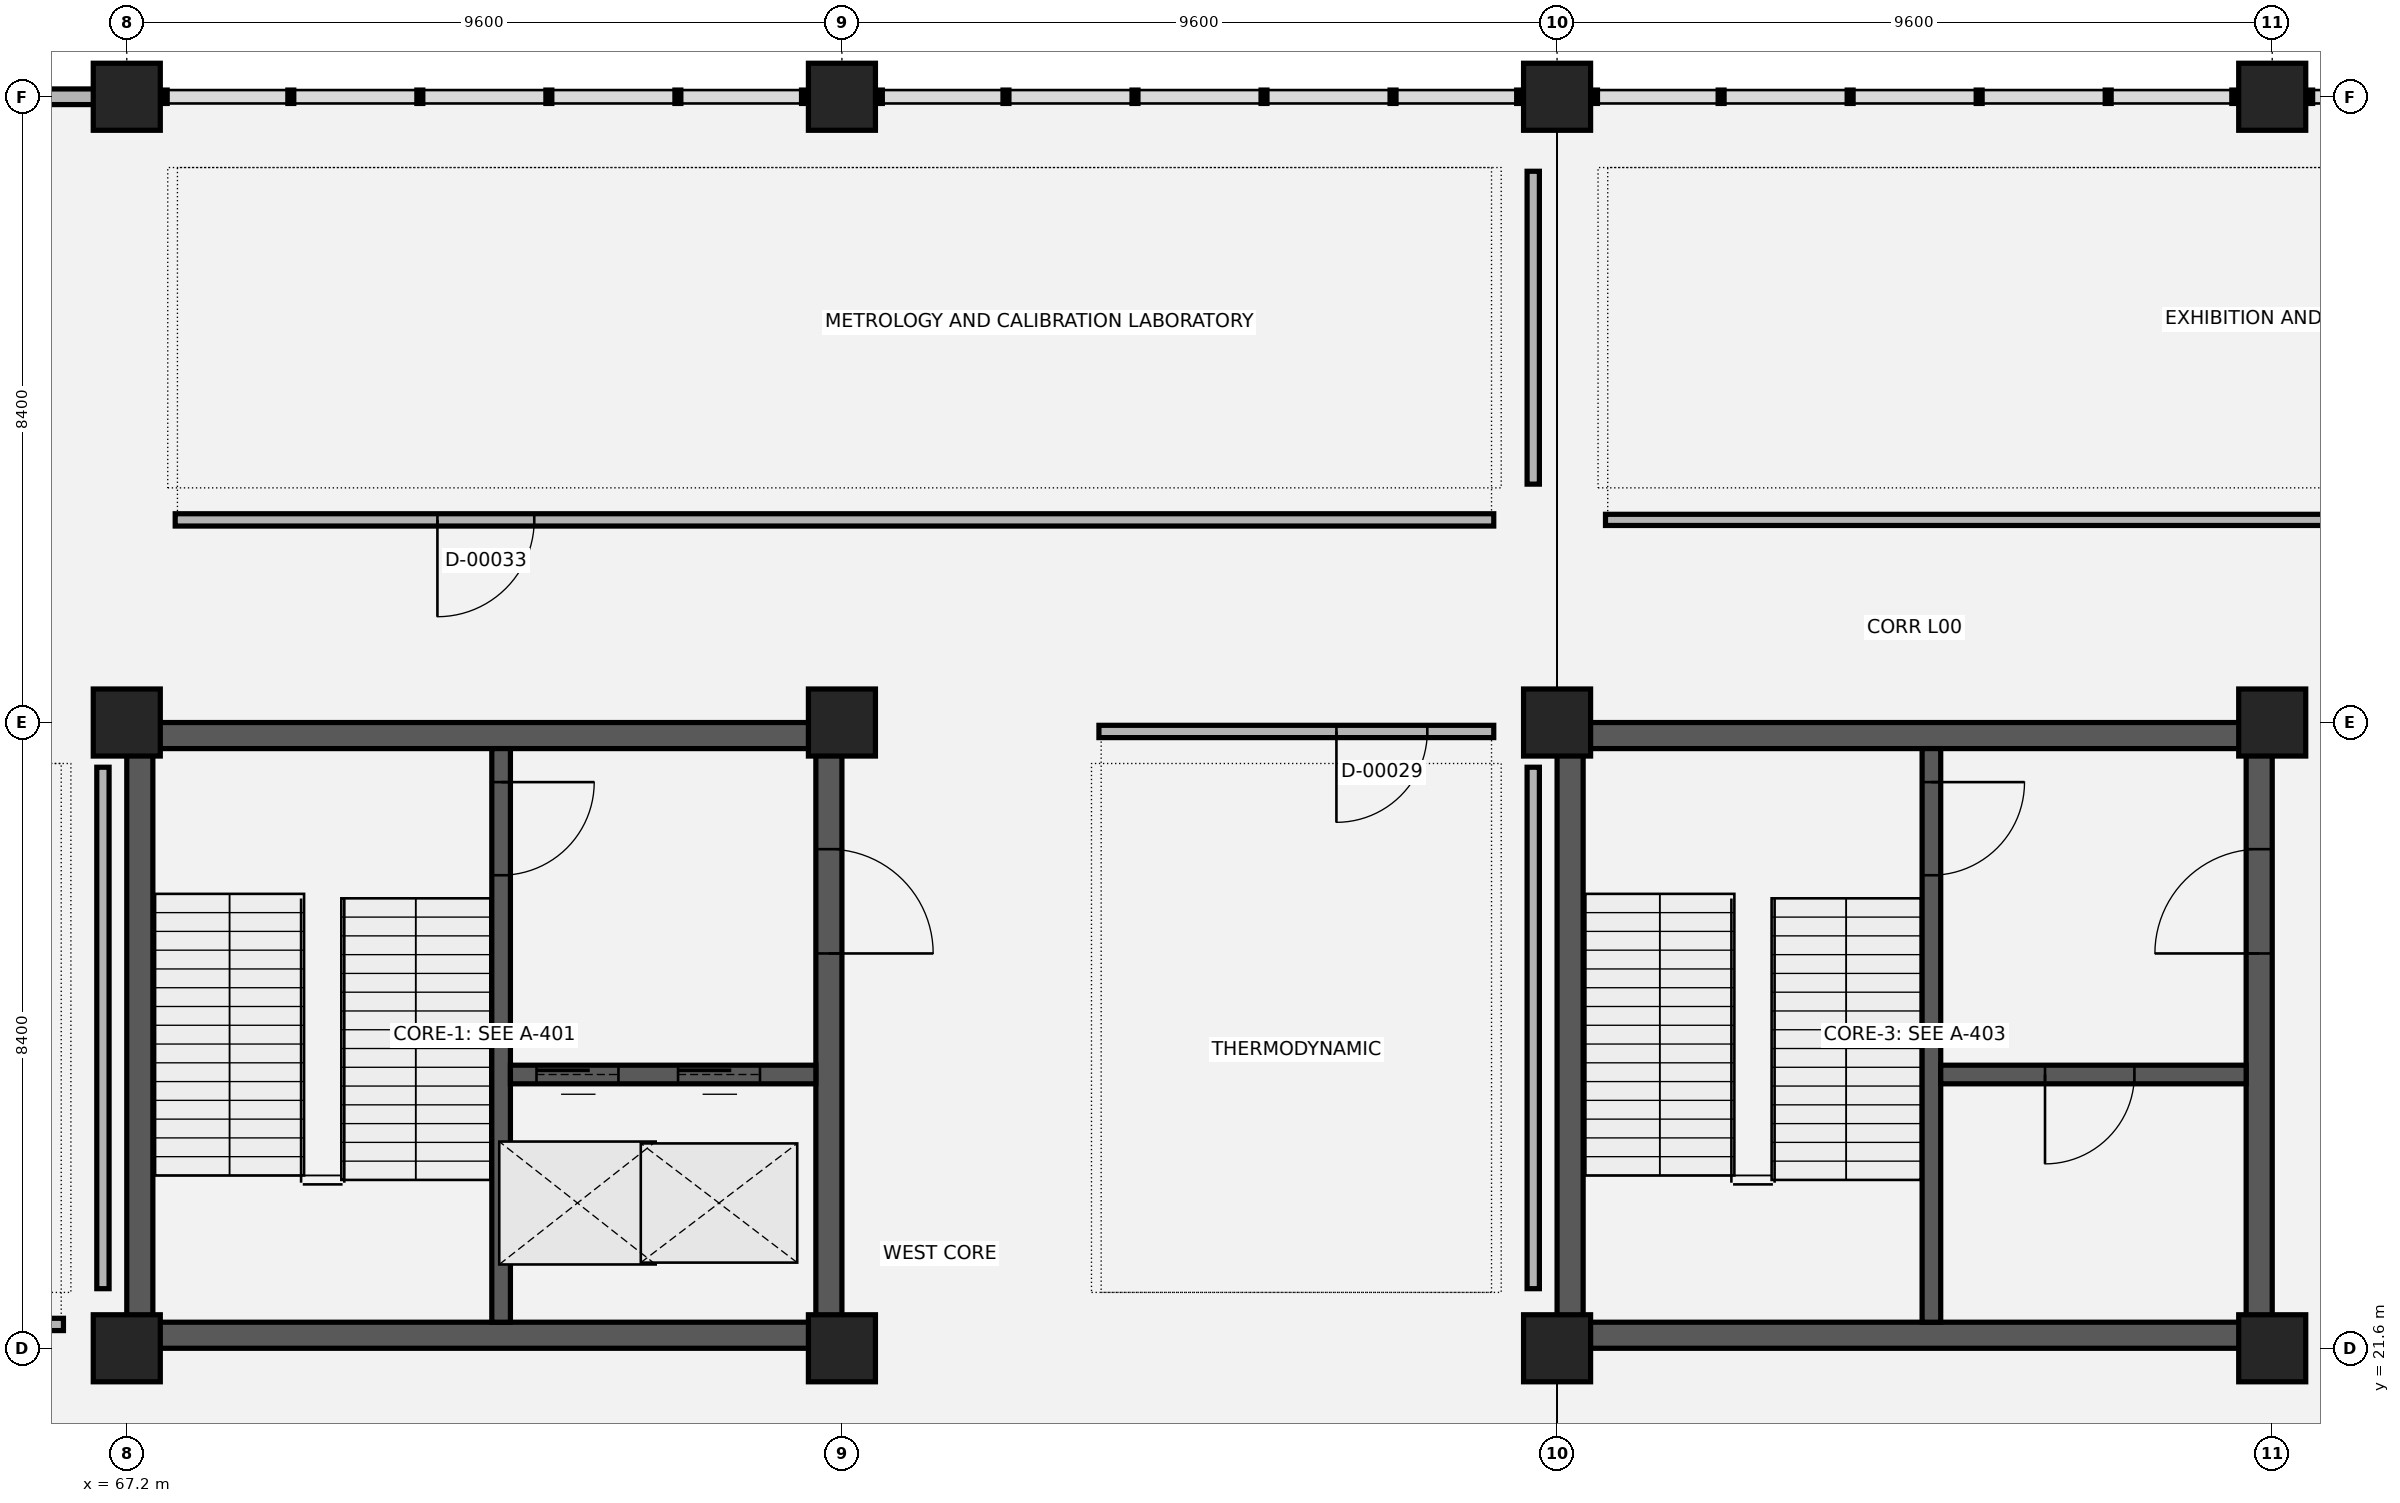
"""IFC4 building model, lengths in metres.
Left out: names, types, materials, properties, quantities, classifications, styles, units other than length and angle.
Written with IfcOpenShell. Run it as: python <this file> out.ifc"""

import sys

from ifc_helpers import new_model, si_unit, direction, frame, frame_2d, origin, origin_2d, place, context, subcontext, project, spatial, rectangle, extrude, element, fill, save


model = new_model("IFC4")
c1 = context("Model", 3, precision=1e-05, world=origin(), true_north=direction((0.0, 1.0)))
c2 = subcontext(c1, "Body", "Model", "MODEL_VIEW")
j1 = project(units=[si_unit("LENGTHUNIT", "METRE"), si_unit("PLANEANGLEUNIT", "RADIAN")], contexts=[c1])
p1 = place(None, origin())
s1 = spatial("IfcSite", under=j1, at=p1, CompositionType="ELEMENT")
p2 = place(p1, origin())
s2 = spatial("IfcBuilding", under=s1, at=p2, CompositionType="ELEMENT")
p3 = place(p2, origin())
s3 = spatial("IfcBuildingStorey", under=s2, at=p3, CompositionType="ELEMENT", Elevation=0.0)
for number, where, z_axis, x_axis in (
    (1, (67.2, 21.6, 0.0), (0.0, 0.0, 1.0), (1.0, 0.0, 0.0)),
    (2, (67.2, 30.0, 0.0), (0.0, 0.0, 1.0), (1.0, 0.0, 0.0)),
    (3, (67.2, 38.4, 0.0), (0.0, 0.0, 1.0), (1.0, 0.0, 0.0)),
    (4, (76.8, 21.6, 0.0), (0.0, 0.0, 1.0), (1.0, 0.0, 0.0)),
    (5, (76.8, 30.0, 0.0), (0.0, 0.0, 1.0), (1.0, 0.0, 0.0)),
    (6, (76.8, 38.4, 0.0), (0.0, 0.0, 1.0), (1.0, 0.0, 0.0)),
    (7, (86.4, 21.6, 0.0), (0.0, 0.0, 1.0), (1.0, 0.0, 0.0)),
    (8, (86.4, 30.0, 0.0), (0.0, 0.0, 1.0), (1.0, 0.0, 0.0)),
    (9, (86.4, 38.4, 0.0), (0.0, 0.0, 1.0), (1.0, 0.0, 0.0)),
    (10, (96.0, 21.6, 0.0), (0.0, 0.0, 1.0), (1.0, 0.0, 0.0)),
    (11, (96.0, 30.0, 0.0), (0.0, 0.0, 1.0), (1.0, 0.0, 0.0)),
    (12, (96.0, 38.4, 0.0), (0.0, 0.0, 1.0), (1.0, 0.0, 0.0)),
):
    element("IfcColumn", number, at=place(p3, frame(where, z_axis=z_axis, x_axis=x_axis)), inside=s3, PredefinedType="COLUMN", context=c2, shape_type="SweptSolid", body=[
        extrude(rectangle(XDim=0.9, YDim=0.9, at=origin_2d()), origin(), (0.0, 0.0, 1.0), 5.4),
    ])
p4 = place(p3, frame((66.82, 38.4, 0.0), z_axis=(0.0, 0.0, 1.0), x_axis=(-1.0, 0.0, 0.0)))
e13 = element("IfcWall", 13, at=p4, inside=s3, PredefinedType="SOLIDWALL", context=c2, shape_type="SweptSolid", body=[
    extrude(rectangle(XDim=4.04, YDim=0.21, at=frame_2d((2.02, 0.0))), origin(), (0.0, 0.0, 1.0), 4.04),
])
p5 = place(p4, frame((1.27, 0.0, 0.9)))
e14 = element("IfcOpeningElement", 14, at=p5, cuts=e13, PredefinedType="OPENING", context=c2, shape_type="SweptSolid", body=[
    extrude(rectangle(XDim=1.5, YDim=1.5, at=frame_2d((0.75, 0.75))), frame((0.0, 0.115, 0.0), z_axis=(0.0, -1.0, 0.0), x_axis=(1.0, 0.0, 0.0)), (0.0, 0.0, 1.0), 0.23),
])
for number, where, z_axis, x_axis in (
    (15, (67.2, 29.825, 0.0), (0.0, 0.0, 1.0), (1.0, 0.0, 0.0)),
    (16, (67.2, 21.775, 0.0), (0.0, 0.0, 1.0), (1.0, 0.0, 0.0)),
):
    element("IfcWall", number, at=place(p3, frame(where, z_axis=z_axis, x_axis=x_axis)), inside=s3, PredefinedType="SHEAR", context=c2, shape_type="SweptSolid", body=[
        extrude(rectangle(XDim=9.6, YDim=0.35, at=frame_2d((4.8, 0.0))), origin(), (0.0, 0.0, 1.0), 5.11),
    ])
p6 = place(p3, frame((67.375, 21.6, 0.0), z_axis=(0.0, 0.0, 1.0), x_axis=(0.0, 1.0, 0.0)))
e17 = element("IfcWall", 17, at=p6, inside=s3, PredefinedType="SHEAR", context=c2, shape_type="SweptSolid", body=[
    extrude(rectangle(XDim=8.4, YDim=0.35, at=frame_2d((4.2, 0.0))), origin(), (0.0, 0.0, 1.0), 5.11),
])
p7 = place(p3, frame((76.625, 21.6, 0.0), z_axis=(0.0, 0.0, 1.0), x_axis=(0.0, 1.0, 0.0)))
e18 = element("IfcWall", 18, at=p7, inside=s3, PredefinedType="SHEAR", context=c2, shape_type="SweptSolid", body=[
    extrude(rectangle(XDim=8.4, YDim=0.35, at=frame_2d((4.2, 0.0))), origin(), (0.0, 0.0, 1.0), 5.11),
])
p8 = place(p7, frame((5.3, 0.0, 0.0)))
e19 = element("IfcOpeningElement", 19, at=p8, cuts=e18, PredefinedType="OPENING", context=c2, shape_type="SweptSolid", body=[
    extrude(rectangle(XDim=1.4, YDim=2.15, at=frame_2d((0.7, 1.075))), frame((0.0, 0.185, 0.0), z_axis=(0.0, -1.0, 0.0), x_axis=(1.0, 0.0, 0.0)), (0.0, 0.0, 1.0), 0.37),
])
p9 = place(p3, frame((72.225, 29.65, 0.0), z_axis=(0.0, 0.0, 1.0), x_axis=(0.0, -1.0, 0.0)))
e20 = element("IfcWall", 20, at=p9, inside=s3, PredefinedType="SHEAR", context=c2, shape_type="SweptSolid", body=[
    extrude(rectangle(XDim=7.7, YDim=0.25, at=frame_2d((3.85, 0.0))), origin(), (0.0, 0.0, 1.0), 5.11),
])
p10 = place(p9, frame((0.45, 0.0, 0.0)))
e21 = element("IfcOpeningElement", 21, at=p10, cuts=e20, PredefinedType="OPENING", context=c2, shape_type="SweptSolid", body=[
    extrude(rectangle(XDim=1.25, YDim=2.15, at=frame_2d((0.625, 1.075))), frame((0.0, 0.135, 0.0), z_axis=(0.0, -1.0, 0.0), x_axis=(1.0, 0.0, 0.0)), (0.0, 0.0, 1.0), 0.27),
])
p11 = place(p3, frame((72.35, 25.275, 0.0), z_axis=(0.0, 0.0, 1.0), x_axis=(1.0, 0.0, 0.0)))
e22 = element("IfcWall", 22, at=p11, inside=s3, PredefinedType="SHEAR", context=c2, shape_type="SweptSolid", body=[
    extrude(rectangle(XDim=4.1, YDim=0.25, at=frame_2d((2.05, 0.0))), origin(), (0.0, 0.0, 1.0), 5.11),
])
p12 = place(p11, frame((0.35, 0.0, 0.0)))
e23 = element("IfcOpeningElement", 23, at=p12, cuts=e22, PredefinedType="OPENING", context=c2, shape_type="SweptSolid", body=[
    extrude(rectangle(XDim=1.1, YDim=2.15, at=frame_2d((0.55, 1.075))), frame((0.0, 0.135, 0.0), z_axis=(0.0, -1.0, 0.0), x_axis=(1.0, 0.0, 0.0)), (0.0, 0.0, 1.0), 0.27),
])
p13 = place(p11, frame((2.25, 0.0, 0.0)))
e24 = element("IfcOpeningElement", 24, at=p13, cuts=e22, PredefinedType="OPENING", context=c2, shape_type="SweptSolid", body=[
    extrude(rectangle(XDim=1.1, YDim=2.15, at=frame_2d((0.55, 1.075))), frame((0.0, 0.135, 0.0), z_axis=(0.0, -1.0, 0.0), x_axis=(1.0, 0.0, 0.0)), (0.0, 0.0, 1.0), 0.27),
])
for number, where, z_axis, x_axis in (
    (25, (86.4, 29.825, 0.0), (0.0, 0.0, 1.0), (1.0, 0.0, 0.0)),
    (26, (86.4, 21.775, 0.0), (0.0, 0.0, 1.0), (1.0, 0.0, 0.0)),
):
    element("IfcWall", number, at=place(p3, frame(where, z_axis=z_axis, x_axis=x_axis)), inside=s3, PredefinedType="SHEAR", context=c2, shape_type="SweptSolid", body=[
        extrude(rectangle(XDim=9.6, YDim=0.35, at=frame_2d((4.8, 0.0))), origin(), (0.0, 0.0, 1.0), 5.11),
    ])
p14 = place(p3, frame((86.575, 21.6, 0.0), z_axis=(0.0, 0.0, 1.0), x_axis=(0.0, 1.0, 0.0)))
e27 = element("IfcWall", 27, at=p14, inside=s3, PredefinedType="SHEAR", context=c2, shape_type="SweptSolid", body=[
    extrude(rectangle(XDim=8.4, YDim=0.35, at=frame_2d((4.2, 0.0))), origin(), (0.0, 0.0, 1.0), 5.11),
])
p15 = place(p3, frame((95.825, 21.6, 0.0), z_axis=(0.0, 0.0, 1.0), x_axis=(0.0, 1.0, 0.0)))
e28 = element("IfcWall", 28, at=p15, inside=s3, PredefinedType="SHEAR", context=c2, shape_type="SweptSolid", body=[
    extrude(rectangle(XDim=8.4, YDim=0.35, at=frame_2d((4.2, 0.0))), origin(), (0.0, 0.0, 1.0), 5.11),
])
p16 = place(p15, frame((5.3, 0.0, 0.0)))
e29 = element("IfcOpeningElement", 29, at=p16, cuts=e28, PredefinedType="OPENING", context=c2, shape_type="SweptSolid", body=[
    extrude(rectangle(XDim=1.4, YDim=2.15, at=frame_2d((0.7, 1.075))), frame((0.0, 0.185, 0.0), z_axis=(0.0, -1.0, 0.0), x_axis=(1.0, 0.0, 0.0)), (0.0, 0.0, 1.0), 0.37),
])
p17 = place(p3, frame((91.425, 29.65, 0.0), z_axis=(0.0, 0.0, 1.0), x_axis=(0.0, -1.0, 0.0)))
e30 = element("IfcWall", 30, at=p17, inside=s3, PredefinedType="SHEAR", context=c2, shape_type="SweptSolid", body=[
    extrude(rectangle(XDim=7.7, YDim=0.25, at=frame_2d((3.85, 0.0))), origin(), (0.0, 0.0, 1.0), 5.11),
])
p18 = place(p17, frame((0.45, 0.0, 0.0)))
e31 = element("IfcOpeningElement", 31, at=p18, cuts=e30, PredefinedType="OPENING", context=c2, shape_type="SweptSolid", body=[
    extrude(rectangle(XDim=1.25, YDim=2.15, at=frame_2d((0.625, 1.075))), frame((0.0, 0.135, 0.0), z_axis=(0.0, -1.0, 0.0), x_axis=(1.0, 0.0, 0.0)), (0.0, 0.0, 1.0), 0.27),
])
p19 = place(p3, frame((91.55, 25.275, 0.0), z_axis=(0.0, 0.0, 1.0), x_axis=(1.0, 0.0, 0.0)))
e32 = element("IfcWall", 32, at=p19, inside=s3, PredefinedType="SHEAR", context=c2, shape_type="SweptSolid", body=[
    extrude(rectangle(XDim=4.1, YDim=0.25, at=frame_2d((2.05, 0.0))), origin(), (0.0, 0.0, 1.0), 5.11),
])
p20 = place(p19, frame((1.4, 0.0, 0.0)))
e33 = element("IfcOpeningElement", 33, at=p20, cuts=e32, PredefinedType="OPENING", context=c2, shape_type="SweptSolid", body=[
    extrude(rectangle(XDim=1.2, YDim=2.15, at=frame_2d((0.6, 1.075))), frame((0.0, 0.135, 0.0), z_axis=(0.0, -1.0, 0.0), x_axis=(1.0, 0.0, 0.0)), (0.0, 0.0, 1.0), 0.27),
])
p21 = place(p3, frame((49.05, 21.92, 0.0), z_axis=(0.0, 0.0, 1.0), x_axis=(1.0, 0.0, 0.0)))
e34 = element("IfcWall", 34, at=p21, inside=s3, PredefinedType="PARTITIONING", context=c2, shape_type="SweptSolid", body=[
    extrude(rectangle(XDim=17.3, YDim=0.165, at=frame_2d((8.65, 0.0))), origin(), (0.0, 0.0, 1.0), 4.04),
])
p22 = place(p21, frame((3.456, 0.0, 0.0)))
e35 = element("IfcOpeningElement", 35, at=p22, cuts=e34, PredefinedType="OPENING", context=c2, shape_type="SweptSolid", body=[
    extrude(rectangle(XDim=1.22, YDim=2.15, at=frame_2d((0.61, 1.075))), frame((0.0, 0.093, 0.0), z_axis=(0.0, -1.0, 0.0), x_axis=(1.0, 0.0, 0.0)), (0.0, 0.0, 1.0), 0.185),
])
p23 = place(p3, frame((66.88, 22.4, 0.0), z_axis=(0.0, 0.0, 1.0), x_axis=(0.0, 1.0, 0.0)))
e36 = element("IfcWall", 36, at=p23, inside=s3, PredefinedType="PARTITIONING", context=c2, shape_type="SweptSolid", body=[
    extrude(rectangle(XDim=7.0, YDim=0.165, at=frame_2d((3.5, 0.0))), origin(), (0.0, 0.0, 1.0), 4.04),
])
p24 = place(p3, frame((80.25, 29.88, 0.0), z_axis=(0.0, 0.0, 1.0), x_axis=(1.0, 0.0, 0.0)))
e37 = element("IfcWall", 37, at=p24, inside=s3, PredefinedType="PARTITIONING", context=c2, shape_type="SweptSolid", body=[
    extrude(rectangle(XDim=5.3, YDim=0.165, at=frame_2d((2.65, 0.0))), origin(), (0.0, 0.0, 1.0), 4.04),
])
p25 = place(p24, frame((3.188, 0.0, 0.0)))
e38 = element("IfcOpeningElement", 38, at=p25, cuts=e37, PredefinedType="OPENING", context=c2, shape_type="SweptSolid", body=[
    extrude(rectangle(XDim=1.22, YDim=2.15, at=frame_2d((0.61, 1.075))), frame((0.0, 0.093, 0.0), z_axis=(0.0, -1.0, 0.0), x_axis=(1.0, 0.0, 0.0)), (0.0, 0.0, 1.0), 0.185),
])
p26 = place(p3, frame((86.08, 22.4, 0.0), z_axis=(0.0, 0.0, 1.0), x_axis=(0.0, 1.0, 0.0)))
e39 = element("IfcWall", 39, at=p26, inside=s3, PredefinedType="PARTITIONING", context=c2, shape_type="SweptSolid", body=[
    extrude(rectangle(XDim=7.0, YDim=0.165, at=frame_2d((3.5, 0.0))), origin(), (0.0, 0.0, 1.0), 4.04),
])
p27 = place(p3, frame((67.85, 32.72, 0.0), z_axis=(0.0, 0.0, 1.0), x_axis=(1.0, 0.0, 0.0)))
e40 = element("IfcWall", 40, at=p27, inside=s3, PredefinedType="PARTITIONING", context=c2, shape_type="SweptSolid", body=[
    extrude(rectangle(XDim=17.7, YDim=0.165, at=frame_2d((8.85, 0.0))), origin(), (0.0, 0.0, 1.0), 4.04),
])
p28 = place(p27, frame((3.52, 0.0, 0.0)))
e41 = element("IfcOpeningElement", 41, at=p28, cuts=e40, PredefinedType="OPENING", context=c2, shape_type="SweptSolid", body=[
    extrude(rectangle(XDim=1.3, YDim=2.15, at=frame_2d((0.65, 1.075))), frame((0.0, 0.093, 0.0), z_axis=(0.0, -1.0, 0.0), x_axis=(1.0, 0.0, 0.0)), (0.0, 0.0, 1.0), 0.185),
])
p29 = place(p3, frame((86.08, 33.2, 0.0), z_axis=(0.0, 0.0, 1.0), x_axis=(0.0, 1.0, 0.0)))
e42 = element("IfcWall", 42, at=p29, inside=s3, PredefinedType="PARTITIONING", context=c2, shape_type="SweptSolid", body=[
    extrude(rectangle(XDim=4.2, YDim=0.165, at=frame_2d((2.1, 0.0))), origin(), (0.0, 0.0, 1.0), 4.04),
])
p30 = place(p3, frame((87.05, 32.72, 0.0), z_axis=(0.0, 0.0, 1.0), x_axis=(1.0, 0.0, 0.0)))
e43 = element("IfcWall", 43, at=p30, inside=s3, PredefinedType="PARTITIONING", context=c2, shape_type="SweptSolid", body=[
    extrude(rectangle(XDim=27.5, YDim=0.15, at=frame_2d((13.75, 0.0))), origin(), (0.0, 0.0, 1.0), 4.04),
])
p31 = place(p30, frame((13.19, 0.0, 0.0)))
e44 = element("IfcOpeningElement", 44, at=p31, cuts=e43, PredefinedType="OPENING", context=c2, shape_type="SweptSolid", body=[
    extrude(rectangle(XDim=1.12, YDim=2.15, at=frame_2d((0.56, 1.075))), frame((0.0, 0.085, 0.0), z_axis=(0.0, -1.0, 0.0), x_axis=(1.0, 0.0, 0.0)), (0.0, 0.0, 1.0), 0.17),
])
p32 = place(p10, origin())
e45 = element("IfcDoor", 45, at=p32, inside=s3, OperationType="SINGLE_SWING_LEFT", PredefinedType="DOOR", context=c2, shape_type="SweptSolid", body=[
    extrude(rectangle(XDim=1.25, YDim=2.15, at=frame_2d((0.625, 1.075))), frame((0.0, 0.025, 0.0), z_axis=(0.0, -1.0, 0.0), x_axis=(1.0, 0.0, 0.0)), (0.0, 0.0, 1.0), 0.05),
])
fill(e21, e45)
p33 = place(p12, origin())
e46 = element("IfcDoor", 46, at=p33, inside=s3, OperationType="SLIDING_TO_LEFT", PredefinedType="DOOR", context=c2, shape_type="SweptSolid", body=[
    extrude(rectangle(XDim=1.1, YDim=2.15, at=frame_2d((0.55, 1.075))), frame((0.0, 0.025, 0.0), z_axis=(0.0, -1.0, 0.0), x_axis=(1.0, 0.0, 0.0)), (0.0, 0.0, 1.0), 0.05),
])
fill(e23, e46)
p34 = place(p13, origin())
e47 = element("IfcDoor", 47, at=p34, inside=s3, OperationType="SLIDING_TO_LEFT", PredefinedType="DOOR", context=c2, shape_type="SweptSolid", body=[
    extrude(rectangle(XDim=1.1, YDim=2.15, at=frame_2d((0.55, 1.075))), frame((0.0, 0.025, 0.0), z_axis=(0.0, -1.0, 0.0), x_axis=(1.0, 0.0, 0.0)), (0.0, 0.0, 1.0), 0.05),
])
fill(e24, e47)
p35 = place(p8, origin())
e48 = element("IfcDoor", 48, at=p35, inside=s3, OperationType="SINGLE_SWING_RIGHT", PredefinedType="DOOR", context=c2, shape_type="SweptSolid", body=[
    extrude(rectangle(XDim=1.4, YDim=2.15, at=frame_2d((0.7, 1.075))), frame((0.0, 0.025, 0.0), z_axis=(0.0, -1.0, 0.0), x_axis=(1.0, 0.0, 0.0)), (0.0, 0.0, 1.0), 0.05),
])
fill(e19, e48)
p36 = place(p18, origin())
e49 = element("IfcDoor", 49, at=p36, inside=s3, OperationType="SINGLE_SWING_LEFT", PredefinedType="DOOR", context=c2, shape_type="SweptSolid", body=[
    extrude(rectangle(XDim=1.25, YDim=2.15, at=frame_2d((0.625, 1.075))), frame((0.0, 0.025, 0.0), z_axis=(0.0, -1.0, 0.0), x_axis=(1.0, 0.0, 0.0)), (0.0, 0.0, 1.0), 0.05),
])
fill(e31, e49)
p37 = place(p20, origin())
e50 = element("IfcDoor", 50, at=p37, inside=s3, OperationType="SINGLE_SWING_RIGHT", PredefinedType="DOOR", context=c2, shape_type="SweptSolid", body=[
    extrude(rectangle(XDim=1.2, YDim=2.15, at=frame_2d((0.6, 1.075))), frame((0.0, 0.025, 0.0), z_axis=(0.0, -1.0, 0.0), x_axis=(1.0, 0.0, 0.0)), (0.0, 0.0, 1.0), 0.05),
])
fill(e33, e50)
p38 = place(p16, origin())
e51 = element("IfcDoor", 51, at=p38, inside=s3, OperationType="SINGLE_SWING_LEFT", PredefinedType="DOOR", context=c2, shape_type="SweptSolid", body=[
    extrude(rectangle(XDim=1.4, YDim=2.15, at=frame_2d((0.7, 1.075))), frame((0.0, 0.025, 0.0), z_axis=(0.0, -1.0, 0.0), x_axis=(1.0, 0.0, 0.0)), (0.0, 0.0, 1.0), 0.05),
])
fill(e29, e51)
p39 = place(p25, origin())
e52 = element("IfcDoor", 52, at=p39, inside=s3, OperationType="SINGLE_SWING_RIGHT", PredefinedType="DOOR", context=c2, shape_type="SweptSolid", body=[
    extrude(rectangle(XDim=1.22, YDim=2.15, at=frame_2d((0.61, 1.075))), frame((0.0, 0.025, 0.0), z_axis=(0.0, -1.0, 0.0), x_axis=(1.0, 0.0, 0.0)), (0.0, 0.0, 1.0), 0.05),
])
fill(e38, e52)
p40 = place(p28, origin())
e53 = element("IfcDoor", 53, at=p40, inside=s3, OperationType="SINGLE_SWING_RIGHT", PredefinedType="DOOR", context=c2, shape_type="SweptSolid", body=[
    extrude(rectangle(XDim=1.3, YDim=2.15, at=frame_2d((0.65, 1.075))), frame((0.0, 0.025, 0.0), z_axis=(0.0, -1.0, 0.0), x_axis=(1.0, 0.0, 0.0)), (0.0, 0.0, 1.0), 0.05),
])
fill(e41, e53)
save(model, sys.argv[1])
